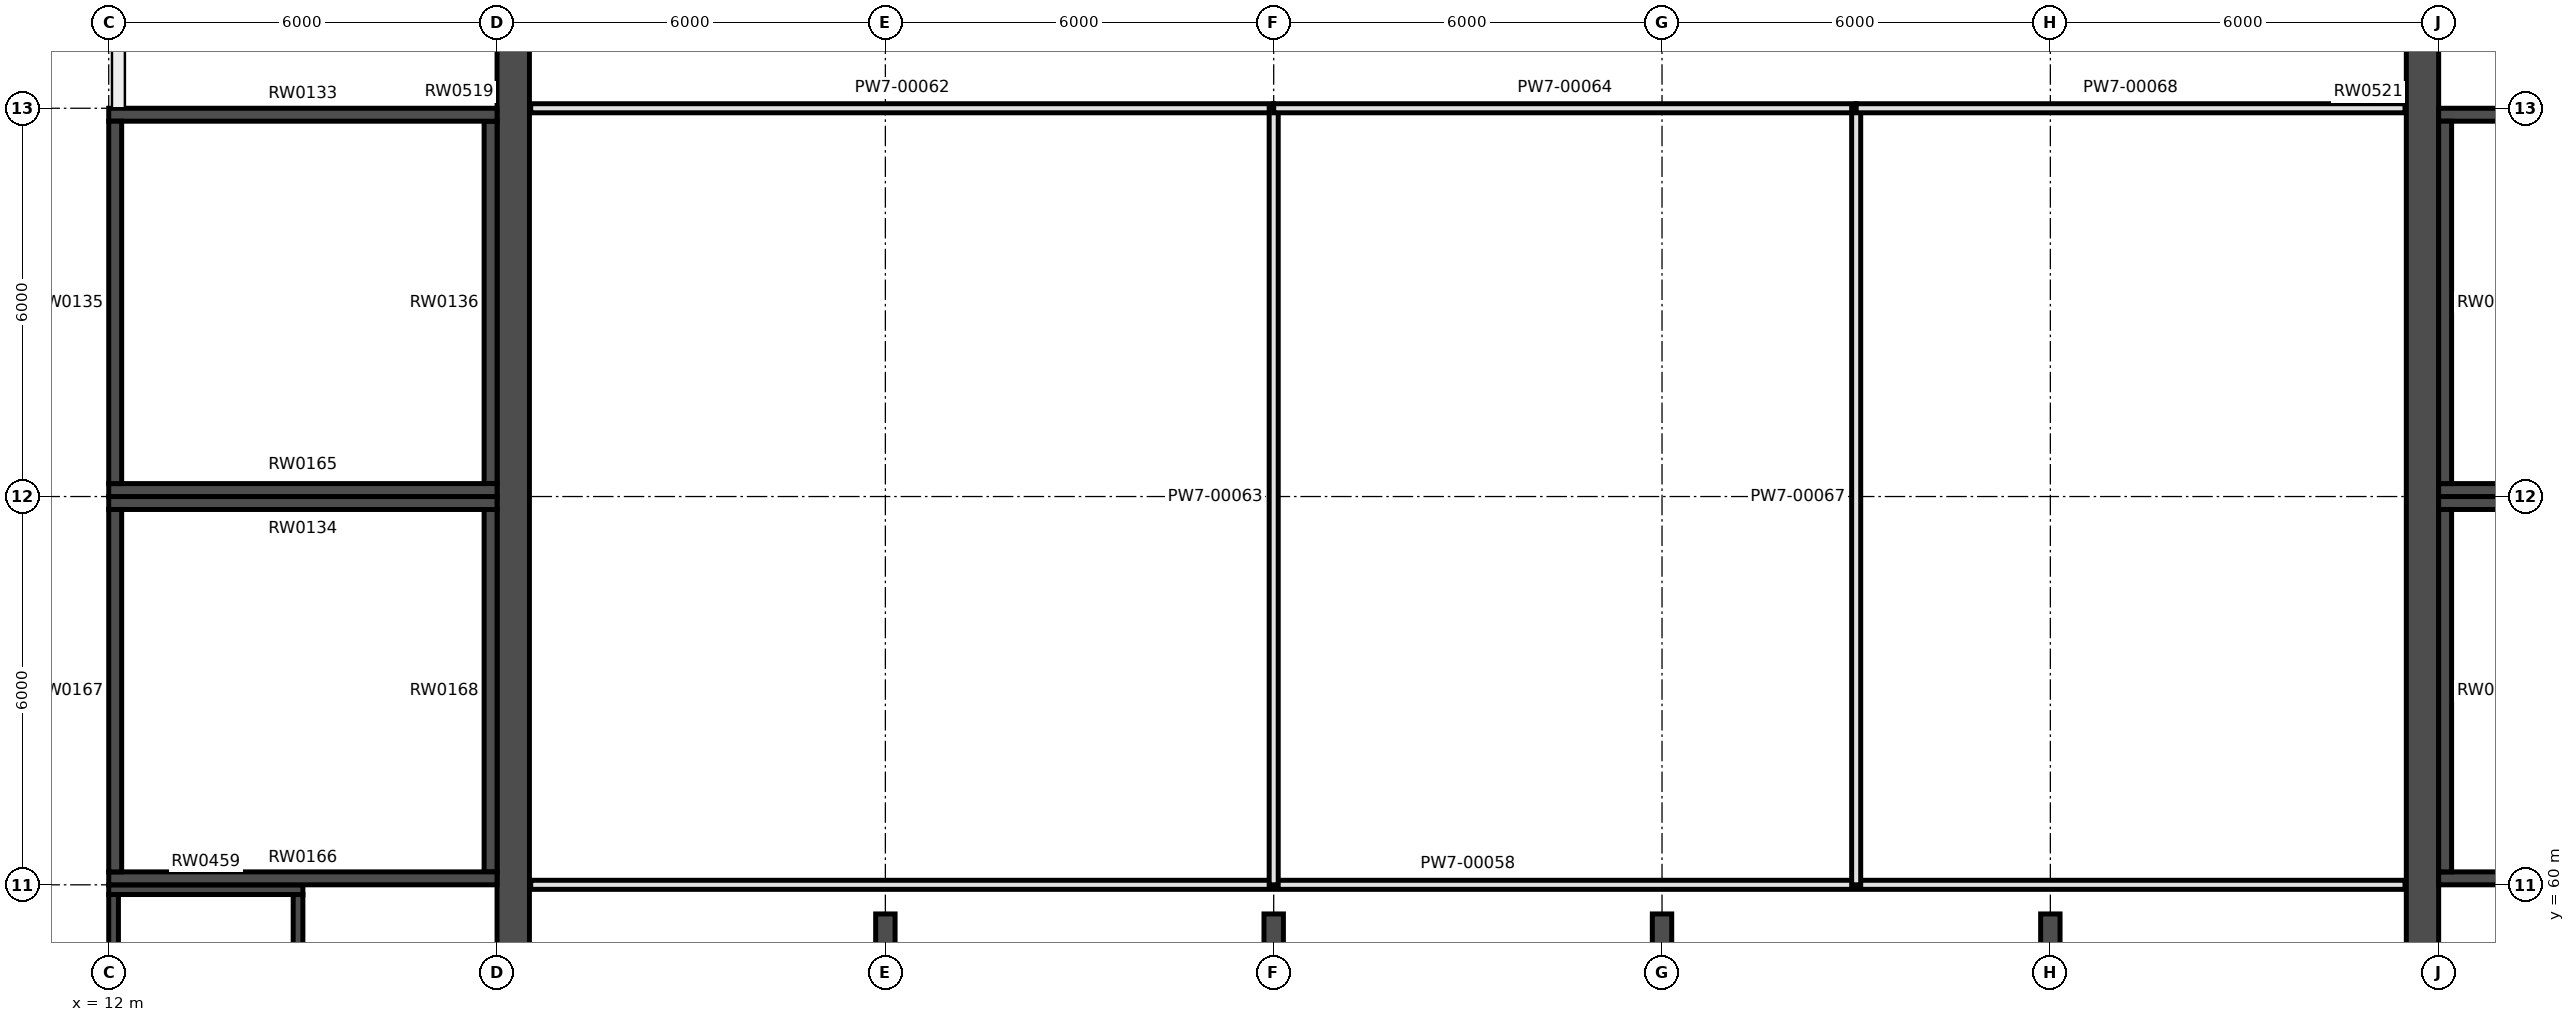
"""IFC4 building model, lengths in metres.
Left out: names, types, materials, properties, quantities, classifications, styles, units other than length and angle.
Written with IfcOpenShell. Run it as: python <this file> out.ifc"""

import sys

from ifc_helpers import new_model, si_unit, direction, frame, frame_2d, origin, place, context, subcontext, project, spatial, rectangle, extrude, element, fill, save


model = new_model("IFC4")
c1 = context("Model", 3, precision=1e-05, world=origin(), true_north=direction((0.0, 1.0)))
c2 = subcontext(c1, "Body", "Model", "MODEL_VIEW")
j1 = project(units=[si_unit("LENGTHUNIT", "METRE"), si_unit("PLANEANGLEUNIT", "RADIAN")], contexts=[c1])
p1 = place(None, origin())
s1 = spatial("IfcSite", under=j1, at=p1, CompositionType="ELEMENT")
p2 = place(p1, origin())
s2 = spatial("IfcBuilding", under=s1, at=p2, CompositionType="ELEMENT")
p3 = place(p2, origin())
s3 = spatial("IfcBuildingStorey", under=s2, at=p3, CompositionType="ELEMENT", Elevation=0.0)
p4 = place(p3, frame((12.0, 71.9, -0.3), z_axis=(0.0, 0.0, 1.0), x_axis=(1.0, 0.0, 0.0)))
e1 = element("IfcWall", 1, at=p4, inside=s3, PredefinedType="SHEAR", context=c2, shape_type="SweptSolid", body=[
    extrude(rectangle(XDim=6.0, YDim=0.2, at=frame_2d((3.0, 0.0))), origin(), (0.0, 0.0, 1.0), 7.3),
])
p5 = place(p4, frame((0.3, 0.0, 0.3)))
e2 = element("IfcOpeningElement", 2, at=p5, cuts=e1, PredefinedType="OPENING", context=c2, shape_type="SweptSolid", body=[
    extrude(rectangle(XDim=1.1, YDim=2.2, at=frame_2d((0.55, 1.1))), frame((0.0, 0.11, 0.0), z_axis=(0.0, -1.0, 0.0), x_axis=(1.0, 0.0, 0.0)), (0.0, 0.0, 1.0), 0.22),
])
p6 = place(p3, frame((12.0, 66.1, -0.3), z_axis=(0.0, 0.0, 1.0), x_axis=(1.0, 0.0, 0.0)))
e3 = element("IfcWall", 3, at=p6, inside=s3, PredefinedType="SHEAR", context=c2, shape_type="SweptSolid", body=[
    extrude(rectangle(XDim=6.0, YDim=0.2, at=frame_2d((3.0, 0.0))), origin(), (0.0, 0.0, 1.0), 7.3),
])
p7 = place(p3, frame((12.1, 66.2, -0.3), z_axis=(0.0, 0.0, 1.0), x_axis=(0.0, 1.0, 0.0)))
e4 = element("IfcWall", 4, at=p7, inside=s3, PredefinedType="SHEAR", context=c2, shape_type="SweptSolid", body=[
    extrude(rectangle(XDim=5.6, YDim=0.2, at=frame_2d((2.8, 0.0))), origin(), (0.0, 0.0, 1.0), 7.3),
])
p8 = place(p7, frame((1.9, 0.0, 0.3)))
e5 = element("IfcOpeningElement", 5, at=p8, cuts=e4, PredefinedType="OPENING", context=c2, shape_type="SweptSolid", body=[
    extrude(rectangle(XDim=1.8, YDim=2.4, at=frame_2d((0.9, 1.2))), frame((0.0, 0.11, 0.0), z_axis=(0.0, -1.0, 0.0), x_axis=(1.0, 0.0, 0.0)), (0.0, 0.0, 1.0), 0.22),
])
p9 = place(p3, frame((17.9, 66.2, -0.3), z_axis=(0.0, 0.0, 1.0), x_axis=(0.0, 1.0, 0.0)))
e6 = element("IfcWall", 6, at=p9, inside=s3, PredefinedType="SHEAR", context=c2, shape_type="SweptSolid", body=[
    extrude(rectangle(XDim=5.6, YDim=0.2, at=frame_2d((2.8, 0.0))), origin(), (0.0, 0.0, 1.0), 7.3),
])
p10 = place(p3, frame((48.0, 71.9, -0.3), z_axis=(0.0, 0.0, 1.0), x_axis=(1.0, 0.0, 0.0)))
e7 = element("IfcWall", 7, at=p10, inside=s3, PredefinedType="SHEAR", context=c2, shape_type="SweptSolid", body=[
    extrude(rectangle(XDim=6.0, YDim=0.2, at=frame_2d((3.0, 0.0))), origin(), (0.0, 0.0, 1.0), 7.3),
])
p11 = place(p10, frame((4.6, 0.0, 0.3)))
e8 = element("IfcOpeningElement", 8, at=p11, cuts=e7, PredefinedType="OPENING", context=c2, shape_type="SweptSolid", body=[
    extrude(rectangle(XDim=1.1, YDim=2.2, at=frame_2d((0.55, 1.1))), frame((0.0, 0.11, 0.0), z_axis=(0.0, -1.0, 0.0), x_axis=(1.0, 0.0, 0.0)), (0.0, 0.0, 1.0), 0.22),
])
p12 = place(p3, frame((48.0, 66.1, -0.3), z_axis=(0.0, 0.0, 1.0), x_axis=(1.0, 0.0, 0.0)))
e9 = element("IfcWall", 9, at=p12, inside=s3, PredefinedType="SHEAR", context=c2, shape_type="SweptSolid", body=[
    extrude(rectangle(XDim=6.0, YDim=0.2, at=frame_2d((3.0, 0.0))), origin(), (0.0, 0.0, 1.0), 7.3),
])
p13 = place(p3, frame((48.1, 66.2, -0.3), z_axis=(0.0, 0.0, 1.0), x_axis=(0.0, 1.0, 0.0)))
e10 = element("IfcWall", 10, at=p13, inside=s3, PredefinedType="SHEAR", context=c2, shape_type="SweptSolid", body=[
    extrude(rectangle(XDim=5.6, YDim=0.2, at=frame_2d((2.8, 0.0))), origin(), (0.0, 0.0, 1.0), 7.3),
])
p14 = place(p3, frame((12.0, 65.9, -0.3), z_axis=(0.0, 0.0, 1.0), x_axis=(1.0, 0.0, 0.0)))
e11 = element("IfcWall", 11, at=p14, inside=s3, PredefinedType="SHEAR", context=c2, shape_type="SweptSolid", body=[
    extrude(rectangle(XDim=6.0, YDim=0.2, at=frame_2d((3.0, 0.0))), origin(), (0.0, 0.0, 1.0), 7.3),
])
p15 = place(p3, frame((12.0, 60.1, -0.3), z_axis=(0.0, 0.0, 1.0), x_axis=(1.0, 0.0, 0.0)))
e12 = element("IfcWall", 12, at=p15, inside=s3, PredefinedType="SHEAR", context=c2, shape_type="SweptSolid", body=[
    extrude(rectangle(XDim=6.0, YDim=0.2, at=frame_2d((3.0, 0.0))), origin(), (0.0, 0.0, 1.0), 7.3),
])
p16 = place(p15, frame((3.375, 0.0, 0.3)))
e13 = element("IfcOpeningElement", 13, at=p16, cuts=e12, PredefinedType="OPENING", context=c2, shape_type="SweptSolid", body=[
    extrude(rectangle(XDim=1.8, YDim=2.2, at=frame_2d((0.9, 1.1))), frame((0.0, 0.11, 0.0), z_axis=(0.0, -1.0, 0.0), x_axis=(1.0, 0.0, 0.0)), (0.0, 0.0, 1.0), 0.22),
])
p17 = place(p3, frame((12.1, 60.2, -0.3), z_axis=(0.0, 0.0, 1.0), x_axis=(0.0, 1.0, 0.0)))
e14 = element("IfcWall", 14, at=p17, inside=s3, PredefinedType="SHEAR", context=c2, shape_type="SweptSolid", body=[
    extrude(rectangle(XDim=5.6, YDim=0.2, at=frame_2d((2.8, 0.0))), origin(), (0.0, 0.0, 1.0), 7.3),
])
p18 = place(p17, frame((0.1, 0.0, 0.3)))
e15 = element("IfcOpeningElement", 15, at=p18, cuts=e14, PredefinedType="OPENING", context=c2, shape_type="SweptSolid", body=[
    extrude(rectangle(XDim=1.1, YDim=2.4, at=frame_2d((0.55, 1.2))), frame((0.0, 0.11, 0.0), z_axis=(0.0, -1.0, 0.0), x_axis=(1.0, 0.0, 0.0)), (0.0, 0.0, 1.0), 0.22),
])
p19 = place(p3, frame((17.9, 60.2, -0.3), z_axis=(0.0, 0.0, 1.0), x_axis=(0.0, 1.0, 0.0)))
e16 = element("IfcWall", 16, at=p19, inside=s3, PredefinedType="SHEAR", context=c2, shape_type="SweptSolid", body=[
    extrude(rectangle(XDim=5.6, YDim=0.2, at=frame_2d((2.8, 0.0))), origin(), (0.0, 0.0, 1.0), 7.3),
])
p20 = place(p3, frame((48.0, 65.9, -0.3), z_axis=(0.0, 0.0, 1.0), x_axis=(1.0, 0.0, 0.0)))
e17 = element("IfcWall", 17, at=p20, inside=s3, PredefinedType="SHEAR", context=c2, shape_type="SweptSolid", body=[
    extrude(rectangle(XDim=6.0, YDim=0.2, at=frame_2d((3.0, 0.0))), origin(), (0.0, 0.0, 1.0), 7.3),
])
p21 = place(p3, frame((48.0, 60.1, -0.3), z_axis=(0.0, 0.0, 1.0), x_axis=(1.0, 0.0, 0.0)))
e18 = element("IfcWall", 18, at=p21, inside=s3, PredefinedType="SHEAR", context=c2, shape_type="SweptSolid", body=[
    extrude(rectangle(XDim=6.0, YDim=0.2, at=frame_2d((3.0, 0.0))), origin(), (0.0, 0.0, 1.0), 7.3),
])
p22 = place(p21, frame((0.825, 0.0, 0.3)))
e19 = element("IfcOpeningElement", 19, at=p22, cuts=e18, PredefinedType="OPENING", context=c2, shape_type="SweptSolid", body=[
    extrude(rectangle(XDim=1.8, YDim=2.2, at=frame_2d((0.9, 1.1))), frame((0.0, 0.11, 0.0), z_axis=(0.0, -1.0, 0.0), x_axis=(1.0, 0.0, 0.0)), (0.0, 0.0, 1.0), 0.22),
])
p23 = place(p3, frame((48.1, 60.2, -0.3), z_axis=(0.0, 0.0, 1.0), x_axis=(0.0, 1.0, 0.0)))
e20 = element("IfcWall", 20, at=p23, inside=s3, PredefinedType="SHEAR", context=c2, shape_type="SweptSolid", body=[
    extrude(rectangle(XDim=5.6, YDim=0.2, at=frame_2d((2.8, 0.0))), origin(), (0.0, 0.0, 1.0), 7.3),
])
p24 = place(p3, frame((12.0, 59.925, -0.3), z_axis=(0.0, 0.0, 1.0), x_axis=(1.0, 0.0, 0.0)))
e21 = element("IfcWall", 21, at=p24, inside=s3, PredefinedType="SHEAR", context=c2, shape_type="SweptSolid", body=[
    extrude(rectangle(XDim=3.0, YDim=0.15, at=frame_2d((1.5, 0.0))), origin(), (0.0, 0.0, 1.0), 7.3),
])
p25 = place(p3, frame((12.075, 54.15, -0.3), z_axis=(0.0, 0.0, 1.0), x_axis=(0.0, 1.0, 0.0)))
e22 = element("IfcWall", 22, at=p25, inside=s3, PredefinedType="SHEAR", context=c2, shape_type="SweptSolid", body=[
    extrude(rectangle(XDim=5.7, YDim=0.15, at=frame_2d((2.85, 0.0))), origin(), (0.0, 0.0, 1.0), 7.3),
])
p26 = place(p3, frame((14.925, 54.15, -0.3), z_axis=(0.0, 0.0, 1.0), x_axis=(0.0, 1.0, 0.0)))
e23 = element("IfcWall", 23, at=p26, inside=s3, PredefinedType="SHEAR", context=c2, shape_type="SweptSolid", body=[
    extrude(rectangle(XDim=5.7, YDim=0.15, at=frame_2d((2.85, 0.0))), origin(), (0.0, 0.0, 1.0), 7.3),
])
p27 = place(p26, frame((2.5, 0.0, 0.3)))
e24 = element("IfcOpeningElement", 24, at=p27, cuts=e23, PredefinedType="OPENING", context=c2, shape_type="SweptSolid", body=[
    extrude(rectangle(XDim=0.6, YDim=2.04, at=frame_2d((0.3, 1.02))), frame((0.0, 0.085, 0.0), z_axis=(0.0, -1.0, 0.0), x_axis=(1.0, 0.0, 0.0)), (0.0, 0.0, 1.0), 0.17),
])
p28 = place(p3, frame((18.25, 54.5, -0.3), z_axis=(0.0, 0.0, 1.0), x_axis=(0.0, 1.0, 0.0)))
e25 = element("IfcWall", 25, at=p28, inside=s3, PredefinedType="SHEAR", context=c2, shape_type="SweptSolid", body=[
    extrude(rectangle(XDim=35.5, YDim=0.5, at=frame_2d((17.75, 0.0))), origin(), (0.0, 0.0, 1.0), 7.3),
])
p29 = place(p28, frame((1.55, 0.0, 0.3)))
e26 = element("IfcOpeningElement", 26, at=p29, cuts=e25, PredefinedType="OPENING", context=c2, shape_type="SweptSolid", body=[
    extrude(rectangle(XDim=1.8, YDim=2.1, at=frame_2d((0.9, 1.05))), frame((0.0, 0.26, 0.0), z_axis=(0.0, -1.0, 0.0), x_axis=(1.0, 0.0, 0.0)), (0.0, 0.0, 1.0), 0.52),
])
p30 = place(p28, frame((18.05, 0.0, 0.3)))
e27 = element("IfcOpeningElement", 27, at=p30, cuts=e25, PredefinedType="OPENING", context=c2, shape_type="SweptSolid", body=[
    extrude(rectangle(XDim=1.8, YDim=2.1, at=frame_2d((0.9, 1.05))), frame((0.0, 0.26, 0.0), z_axis=(0.0, -1.0, 0.0), x_axis=(1.0, 0.0, 0.0)), (0.0, 0.0, 1.0), 0.52),
])
p31 = place(p3, frame((47.75, 54.5, -0.3), z_axis=(0.0, 0.0, 1.0), x_axis=(0.0, 1.0, 0.0)))
e28 = element("IfcWall", 28, at=p31, inside=s3, PredefinedType="SHEAR", context=c2, shape_type="SweptSolid", body=[
    extrude(rectangle(XDim=35.5, YDim=0.5, at=frame_2d((17.75, 0.0))), origin(), (0.0, 0.0, 1.0), 7.3),
])
p32 = place(p31, frame((18.05, 0.0, 0.3)))
e29 = element("IfcOpeningElement", 29, at=p32, cuts=e28, PredefinedType="OPENING", context=c2, shape_type="SweptSolid", body=[
    extrude(rectangle(XDim=1.8, YDim=2.1, at=frame_2d((0.9, 1.05))), frame((0.0, 0.26, 0.0), z_axis=(0.0, -1.0, 0.0), x_axis=(1.0, 0.0, 0.0)), (0.0, 0.0, 1.0), 0.52),
])
p33 = place(p31, frame((3.6, 0.0, 0.3)))
e30 = element("IfcOpeningElement", 30, at=p33, cuts=e28, PredefinedType="OPENING", context=c2, shape_type="SweptSolid", body=[
    extrude(rectangle(XDim=1.0, YDim=2.1, at=frame_2d((0.5, 1.05))), frame((0.0, 0.26, 0.0), z_axis=(0.0, -1.0, 0.0), x_axis=(1.0, 0.0, 0.0)), (0.0, 0.0, 1.0), 0.52),
])
for number, where, z_axis, x_axis in (
    (31, (24.0, 54.5, -0.3), (0.0, 0.0, 1.0), (0.0, 1.0, 0.0)),
    (32, (30.0, 54.5, -0.3), (0.0, 0.0, 1.0), (0.0, 1.0, 0.0)),
    (33, (36.0, 54.5, -0.3), (0.0, 0.0, 1.0), (0.0, 1.0, 0.0)),
    (34, (42.0, 54.5, -0.3), (0.0, 0.0, 1.0), (0.0, 1.0, 0.0)),
):
    element("IfcWall", number, at=place(p3, frame(where, z_axis=z_axis, x_axis=x_axis)), inside=s3, PredefinedType="SHEAR", context=c2, shape_type="SweptSolid", body=[
        extrude(rectangle(XDim=5.05, YDim=0.3, at=frame_2d((2.525, 0.0))), origin(), (0.0, 0.0, 1.0), 4.0),
    ])
p34 = place(p3, frame((18.52, 60.0, 0.0), z_axis=(0.0, 0.0, 1.0), x_axis=(1.0, 0.0, 0.0)))
e35 = element("IfcWall", 35, at=p34, inside=s3, PredefinedType="PARTITIONING", context=c2, shape_type="SweptSolid", body=[
    extrude(rectangle(XDim=28.96, YDim=0.14, at=frame_2d((14.48, 0.0))), origin(), (0.0, 0.0, 1.0), 2.964),
])
p35 = place(p3, frame((18.52, 72.0, 0.0), z_axis=(0.0, 0.0, 1.0), x_axis=(1.0, 0.0, 0.0)))
e36 = element("IfcWall", 36, at=p35, inside=s3, PredefinedType="PARTITIONING", context=c2, shape_type="SweptSolid", body=[
    extrude(rectangle(XDim=11.48, YDim=0.14, at=frame_2d((5.74, 0.0))), origin(), (0.0, 0.0, 1.0), 3.924),
])
p36 = place(p35, frame((4.93, 0.0, 0.0)))
e37 = element("IfcOpeningElement", 37, at=p36, cuts=e36, PredefinedType="OPENING", context=c2, shape_type="SweptSolid", body=[
    extrude(rectangle(XDim=1.0, YDim=2.1, at=frame_2d((0.5, 1.05))), frame((0.0, 0.08, 0.0), z_axis=(0.0, -1.0, 0.0), x_axis=(1.0, 0.0, 0.0)), (0.0, 0.0, 1.0), 0.16),
])
p37 = place(p3, frame((30.0, 60.0, 0.0), z_axis=(0.0, 0.0, 1.0), x_axis=(0.0, 1.0, 0.0)))
e38 = element("IfcWall", 38, at=p37, inside=s3, PredefinedType="PARTITIONING", context=c2, shape_type="SweptSolid", body=[
    extrude(rectangle(XDim=12.0, YDim=0.14, at=frame_2d((6.0, 0.0))), origin(), (0.0, 0.0, 1.0), 2.964),
])
p38 = place(p3, frame((30.0, 72.0, 0.0), z_axis=(0.0, 0.0, 1.0), x_axis=(1.0, 0.0, 0.0)))
e39 = element("IfcWall", 39, at=p38, inside=s3, PredefinedType="PARTITIONING", context=c2, shape_type="SweptSolid", body=[
    extrude(rectangle(XDim=9.0, YDim=0.14, at=frame_2d((4.5, 0.0))), origin(), (0.0, 0.0, 1.0), 3.924),
])
p39 = place(p38, frame((3.95, 0.0, 0.0)))
e40 = element("IfcOpeningElement", 40, at=p39, cuts=e39, PredefinedType="OPENING", context=c2, shape_type="SweptSolid", body=[
    extrude(rectangle(XDim=1.0, YDim=2.1, at=frame_2d((0.5, 1.05))), frame((0.0, 0.08, 0.0), z_axis=(0.0, -1.0, 0.0), x_axis=(1.0, 0.0, 0.0)), (0.0, 0.0, 1.0), 0.16),
])
p40 = place(p3, frame((39.0, 60.0, 0.0), z_axis=(0.0, 0.0, 1.0), x_axis=(0.0, 1.0, 0.0)))
e41 = element("IfcWall", 41, at=p40, inside=s3, PredefinedType="PARTITIONING", context=c2, shape_type="SweptSolid", body=[
    extrude(rectangle(XDim=12.0, YDim=0.14, at=frame_2d((6.0, 0.0))), origin(), (0.0, 0.0, 1.0), 2.964),
])
p41 = place(p3, frame((39.0, 72.0, 0.0), z_axis=(0.0, 0.0, 1.0), x_axis=(1.0, 0.0, 0.0)))
e42 = element("IfcWall", 42, at=p41, inside=s3, PredefinedType="PARTITIONING", context=c2, shape_type="SweptSolid", body=[
    extrude(rectangle(XDim=8.48, YDim=0.14, at=frame_2d((4.24, 0.0))), origin(), (0.0, 0.0, 1.0), 3.924),
])
p42 = place(p41, frame((3.95, 0.0, 0.0)))
e43 = element("IfcOpeningElement", 43, at=p42, cuts=e42, PredefinedType="OPENING", context=c2, shape_type="SweptSolid", body=[
    extrude(rectangle(XDim=1.0, YDim=2.1, at=frame_2d((0.5, 1.05))), frame((0.0, 0.08, 0.0), z_axis=(0.0, -1.0, 0.0), x_axis=(1.0, 0.0, 0.0)), (0.0, 0.0, 1.0), 0.16),
])
p43 = place(p8, origin())
e44 = element("IfcDoor", 44, at=p43, inside=s3, OperationType="DOUBLE_DOOR_SINGLE_SWING", PredefinedType="DOOR", context=c2, shape_type="SweptSolid", body=[
    extrude(rectangle(XDim=1.8, YDim=2.4, at=frame_2d((0.9, 1.2))), frame((0.0, 0.025, 0.0), z_axis=(0.0, -1.0, 0.0), x_axis=(1.0, 0.0, 0.0)), (0.0, 0.0, 1.0), 0.05),
])
fill(e5, e44)
p44 = place(p18, origin())
e45 = element("IfcDoor", 45, at=p44, inside=s3, OperationType="DOUBLE_DOOR_SINGLE_SWING", PredefinedType="DOOR", context=c2, shape_type="SweptSolid", body=[
    extrude(rectangle(XDim=1.1, YDim=2.4, at=frame_2d((0.55, 1.2))), frame((0.0, 0.025, 0.0), z_axis=(0.0, -1.0, 0.0), x_axis=(1.0, 0.0, 0.0)), (0.0, 0.0, 1.0), 0.05),
])
fill(e15, e45)
p45 = place(p36, frame((1.0, 0.0, 0.0), z_axis=(0.0, 0.0, 1.0), x_axis=(-1.0, 0.0, 0.0)))
e46 = element("IfcDoor", 46, at=p45, inside=s3, OperationType="SINGLE_SWING_LEFT", PredefinedType="DOOR", context=c2, shape_type="SweptSolid", body=[
    extrude(rectangle(XDim=1.0, YDim=2.1, at=frame_2d((0.5, 1.05))), frame((0.0, 0.025, 0.0), z_axis=(0.0, -1.0, 0.0), x_axis=(1.0, 0.0, 0.0)), (0.0, 0.0, 1.0), 0.05),
])
fill(e37, e46)
p46 = place(p39, frame((1.0, 0.0, 0.0), z_axis=(0.0, 0.0, 1.0), x_axis=(-1.0, 0.0, 0.0)))
e47 = element("IfcDoor", 47, at=p46, inside=s3, OperationType="SINGLE_SWING_LEFT", PredefinedType="DOOR", context=c2, shape_type="SweptSolid", body=[
    extrude(rectangle(XDim=1.0, YDim=2.1, at=frame_2d((0.5, 1.05))), frame((0.0, 0.025, 0.0), z_axis=(0.0, -1.0, 0.0), x_axis=(1.0, 0.0, 0.0)), (0.0, 0.0, 1.0), 0.05),
])
fill(e40, e47)
p47 = place(p42, frame((1.0, 0.0, 0.0), z_axis=(0.0, 0.0, 1.0), x_axis=(-1.0, 0.0, 0.0)))
e48 = element("IfcDoor", 48, at=p47, inside=s3, OperationType="SINGLE_SWING_LEFT", PredefinedType="DOOR", context=c2, shape_type="SweptSolid", body=[
    extrude(rectangle(XDim=1.0, YDim=2.1, at=frame_2d((0.5, 1.05))), frame((0.0, 0.025, 0.0), z_axis=(0.0, -1.0, 0.0), x_axis=(1.0, 0.0, 0.0)), (0.0, 0.0, 1.0), 0.05),
])
fill(e43, e48)
p48 = place(p5, frame((1.1, 0.0, 0.0), z_axis=(0.0, 0.0, 1.0), x_axis=(-1.0, 0.0, 0.0)))
e49 = element("IfcDoor", 49, at=p48, inside=s3, OperationType="SINGLE_SWING_LEFT", PredefinedType="DOOR", context=c2, shape_type="SweptSolid", body=[
    extrude(rectangle(XDim=1.1, YDim=2.2, at=frame_2d((0.55, 1.1))), frame((0.0, 0.025, 0.0), z_axis=(0.0, -1.0, 0.0), x_axis=(1.0, 0.0, 0.0)), (0.0, 0.0, 1.0), 0.05),
])
fill(e2, e49)
p49 = place(p16, origin())
e50 = element("IfcDoor", 50, at=p49, inside=s3, OperationType="DOUBLE_DOOR_SINGLE_SWING", PredefinedType="DOOR", context=c2, shape_type="SweptSolid", body=[
    extrude(rectangle(XDim=1.8, YDim=2.2, at=frame_2d((0.9, 1.1))), frame((0.0, 0.025, 0.0), z_axis=(0.0, -1.0, 0.0), x_axis=(1.0, 0.0, 0.0)), (0.0, 0.0, 1.0), 0.05),
])
fill(e13, e50)
p50 = place(p22, origin())
e51 = element("IfcDoor", 51, at=p50, inside=s3, OperationType="DOUBLE_DOOR_SINGLE_SWING", PredefinedType="DOOR", context=c2, shape_type="SweptSolid", body=[
    extrude(rectangle(XDim=1.8, YDim=2.2, at=frame_2d((0.9, 1.1))), frame((0.0, 0.025, 0.0), z_axis=(0.0, -1.0, 0.0), x_axis=(1.0, 0.0, 0.0)), (0.0, 0.0, 1.0), 0.05),
])
fill(e19, e51)
p51 = place(p30, frame((1.8, 0.0, 0.0), z_axis=(0.0, 0.0, 1.0), x_axis=(-1.0, 0.0, 0.0)))
e52 = element("IfcDoor", 52, at=p51, inside=s3, OperationType="DOUBLE_DOOR_SINGLE_SWING", PredefinedType="DOOR", context=c2, shape_type="SweptSolid", body=[
    extrude(rectangle(XDim=1.8, YDim=2.1, at=frame_2d((0.9, 1.05))), frame((0.0, 0.025, 0.0), z_axis=(0.0, -1.0, 0.0), x_axis=(1.0, 0.0, 0.0)), (0.0, 0.0, 1.0), 0.05),
])
fill(e27, e52)
p52 = place(p32, origin())
e53 = element("IfcDoor", 53, at=p52, inside=s3, OperationType="DOUBLE_DOOR_SINGLE_SWING", PredefinedType="DOOR", context=c2, shape_type="SweptSolid", body=[
    extrude(rectangle(XDim=1.8, YDim=2.1, at=frame_2d((0.9, 1.05))), frame((0.0, 0.025, 0.0), z_axis=(0.0, -1.0, 0.0), x_axis=(1.0, 0.0, 0.0)), (0.0, 0.0, 1.0), 0.05),
])
fill(e29, e53)
save(model, sys.argv[1])
